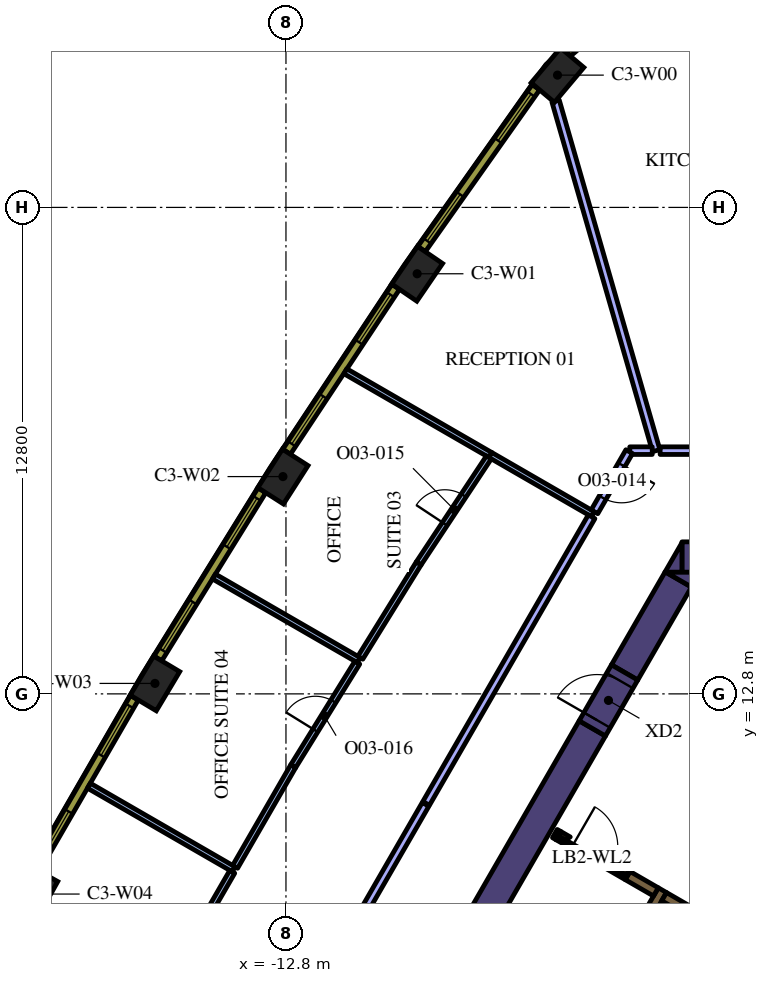
"""IFC4 building model, lengths in metres.
Left out: names, types, materials, properties, quantities, classifications, styles, units other than length and angle.
Written with IfcOpenShell. Run it as: python <this file> out.ifc"""

import sys

from ifc_helpers import new_model, si_unit, direction, frame, frame_2d, origin, origin_2d, place, context, subcontext, project, spatial, polyline, rectangle, outline, extrude, element, fill, save


model = new_model("IFC4")
c1 = context("Model", 3, precision=1e-05, world=origin(), true_north=direction((0.0, 1.0)))
c2 = subcontext(c1, "Body", "Model", "MODEL_VIEW")
j1 = project(units=[si_unit("LENGTHUNIT", "METRE"), si_unit("PLANEANGLEUNIT", "RADIAN")], contexts=[c1])
p1 = place(None, origin())
s1 = spatial("IfcSite", under=j1, at=p1, CompositionType="ELEMENT")
p2 = place(p1, origin())
s2 = spatial("IfcBuilding", under=s1, at=p2, CompositionType="ELEMENT")
p3 = place(p2, frame((0.0, 0.0, 171.0)))
s3 = spatial("IfcBuildingStorey", under=s2, at=p3, CompositionType="ELEMENT", Elevation=171.0)
for number, where, z_axis, x_axis in (
    (1, (-5.654, 29.081, 0.0), (0.0, 0.0, 1.0), (-0.644, -0.765, 0.0)),
    (2, (-9.348, 23.854, 0.0), (0.0, 0.0, 1.0), (-0.565, -0.825, 0.0)),
    (3, (-12.88, 18.517, 0.0), (0.0, 0.0, 1.0), (-0.539, -0.842, 0.0)),
    (4, (-16.247, 13.075, 0.0), (0.0, 0.0, 1.0), (-0.513, -0.858, 0.0)),
    (5, (-19.447, 7.533, 0.0), (0.0, 0.0, 1.0), (-0.487, -0.874, 0.0)),
):
    element("IfcColumn", number, at=place(p3, frame(where, z_axis=z_axis, x_axis=x_axis)), inside=s3, PredefinedType="COLUMN", context=c2, shape_type="SweptSolid", body=[
        extrude(rectangle(XDim=1.2, YDim=0.8, at=origin_2d()), origin(), (0.0, 0.0, 1.0), 4.2),
    ])
p4 = place(p3, frame((-2.379, 16.4, 0.0), z_axis=(0.0, 0.0, 1.0), x_axis=(1.0, 0.0, 0.0)))
e6 = element("IfcWall", 6, at=p4, inside=s3, PredefinedType="SOLIDWALL", context=c2, shape_type="SweptSolid", body=[
    extrude(rectangle(XDim=3.824, YDim=0.8, at=frame_2d((1.912, 0.0))), origin(), (0.0, 0.0, 1.0), 4.2),
])
p5 = place(p3, origin())
e7 = element("IfcWall", 7, at=p5, inside=s3, PredefinedType="SOLIDWALL", context=c2, shape_type="SweptSolid", body=[
    extrude(outline(polyline([(-2.829, 16.0), (-2.381, 16.776), (-2.381, 16.0), (-2.829, 16.0)])), origin(), (0.0, 0.0, 1.0), 4.2),
])
p6 = place(p3, frame((-2.477, 15.81, 0.0), z_axis=(0.0, 0.0, 1.0), x_axis=(-0.499969377405, -0.866043083026, 0.0)))
e8 = element("IfcWall", 8, at=p6, inside=s3, PredefinedType="SOLIDWALL", context=c2, shape_type="SweptSolid", body=[
    extrude(rectangle(XDim=2.824, YDim=0.8, at=frame_2d((1.412, 0.0))), origin(), (0.0, 0.0, 1.0), 4.2),
])
e9 = element("IfcWall", 9, at=p5, inside=s3, PredefinedType="SOLIDWALL", context=c2, shape_type="SweptSolid", body=[
    extrude(outline(polyline([(-1.905, 16.0), (-2.129, 15.612), (-2.801, 16.0), (-1.905, 16.0)])), origin(), (0.0, 0.0, 1.0), 4.2),
])
p7 = place(p3, frame((-12.668, -1.842, 0.0), z_axis=(0.0, 0.0, 1.0), x_axis=(0.500003640647, 0.866023301845, 0.0)))
e10 = element("IfcWall", 10, at=p7, inside=s3, PredefinedType="SOLIDWALL", context=c2, shape_type="SweptSolid", body=[
    extrude(rectangle(XDim=15.858, YDim=0.8, at=frame_2d((7.929, 0.0))), origin(), (0.0, 0.0, 1.0), 4.2),
])
p8 = place(p3, frame((-8.06, -1.311, 0.0), z_axis=(0.0, 0.0, 1.0), x_axis=(0.50000273126, 0.866023826885, 0.0)))
e11 = element("IfcWall", 11, at=p8, inside=s3, PredefinedType="SOLIDWALL", context=c2, shape_type="SweptSolid", body=[
    extrude(rectangle(XDim=10.33, YDim=0.25, at=frame_2d((5.165, 0.0))), origin(), (0.0, 0.0, 1.0), 4.2),
])
p9 = place(p3, frame((-1.76, 6.836, 0.0), z_axis=(0.0, 0.0, 1.0), x_axis=(-0.865952863304, 0.500125622755, 0.0)))
e12 = element("IfcWall", 12, at=p9, inside=s3, PredefinedType="SOLIDWALL", context=c2, shape_type="SweptSolid", body=[
    extrude(rectangle(XDim=1.258, YDim=0.25, at=frame_2d((0.629, 0.0))), origin(), (0.0, 0.0, 1.0), 4.2),
])
p10 = place(p3, frame((-5.725, 9.125, 0.0), z_axis=(0.0, 0.0, 1.0), x_axis=(0.866185586049, -0.49972245349, 0.0)))
e13 = element("IfcWall", 13, at=p10, inside=s3, PredefinedType="SOLIDWALL", context=c2, shape_type="SweptSolid", body=[
    extrude(rectangle(XDim=0.11, YDim=0.25, at=frame_2d((0.055, 0.0))), origin(), (0.0, 0.0, 1.0), 4.2),
])
p11 = place(p3, frame((-3.066, 7.59, 0.0), z_axis=(0.0, 0.0, 1.0), x_axis=(-0.866081358704, 0.49990307071, 0.0)))
e14 = element("IfcWall", 14, at=p11, inside=s3, PredefinedType="SOLIDWALL", context=c2, shape_type="SweptSolid", body=[
    extrude(rectangle(XDim=0.858, YDim=0.25, at=frame_2d((0.429, 0.0))), origin(), (0.0, 0.0, 1.0), 4.2),
])
e15 = element("IfcWall", 15, at=p5, inside=s3, PredefinedType="SOLIDWALL", context=c2, shape_type="SweptSolid", body=[
    extrude(outline(polyline([(-3.748, 8.128), (-3.813, 8.015), (-4.027, 8.139), (-4.017, 8.156), (-4.008, 8.173), (-4.0, 8.192), (-3.995, 8.21), (-3.991, 8.23), (-3.99, 8.25), (-3.99, 8.268), (-3.748, 8.128)])), origin(), (0.0, 0.0, 1.0), 4.2),
])
e16 = element("IfcWall", 16, at=p5, inside=s3, PredefinedType="SOLIDWALL", context=c2, shape_type="SweptSolid", body=[
    extrude(outline(polyline([(-5.689, 8.96), (-5.69, 8.961), (-5.565, 9.177), (-5.319, 9.035), (-5.335, 9.026), (-5.351, 9.015), (-5.366, 9.002), (-5.379, 8.988), (-5.392, 8.972), (-5.402, 8.956), (-5.412, 8.939), (-5.629, 9.064), (-5.629, 9.064), (-5.689, 8.96)])), origin(), (0.0, 0.0, 1.0), 4.2),
])
p12 = place(p3, frame((-5.659, 9.012, 0.0), z_axis=(0.0, 0.0, 1.0), x_axis=(0.866009402589, -0.500027713859, 0.0)))
e17 = element("IfcWall", 17, at=p12, inside=s3, PredefinedType="PARTITIONING", context=c2, shape_type="SweptSolid", body=[
    extrude(rectangle(XDim=2.1, YDim=0.12, at=frame_2d((1.05, 0.0))), origin(), (0.0, 0.0, 1.0), 3.15),
])
p13 = place(p12, frame((0.45, 0.0, 0.0)))
e18 = element("IfcOpeningElement", 18, at=p13, cuts=e17, PredefinedType="OPENING", context=c2, shape_type="SweptSolid", body=[
    extrude(rectangle(XDim=1.2, YDim=2.1, at=frame_2d((0.6, 1.05))), frame((0.0, 0.07, 0.0), z_axis=(0.0, -1.0, 0.0), x_axis=(1.0, 0.0, 0.0)), (0.0, 0.0, 1.0), 0.14),
])
p14 = place(p3, frame((-4.739, 11.892, 0.0), z_axis=(0.0, 0.0, 1.0), x_axis=(0.500062241894, 0.865989465428, 0.0)))
e19 = element("IfcWall", 19, at=p14, inside=s3, PredefinedType="SOLIDWALL", context=c2, shape_type="SweptSolid", body=[
    extrude(rectangle(XDim=1.7, YDim=0.8, at=frame_2d((0.85, 0.0))), origin(), (0.0, 0.0, 1.0), 4.2),
])
p15 = place(p14, frame((0.25, 0.0, 0.0)))
e20 = element("IfcOpeningElement", 20, at=p15, cuts=e19, PredefinedType="OPENING", context=c2, shape_type="SweptSolid", body=[
    extrude(rectangle(XDim=1.2, YDim=2.1, at=frame_2d((0.6, 1.05))), frame((0.0, 0.41, 0.0), z_axis=(0.0, -1.0, 0.0), x_axis=(1.0, 0.0, 0.0)), (0.0, 0.0, 1.0), 0.82),
])
p16 = place(p3, frame((-3.058, 19.2, 0.0), z_axis=(0.0, 0.0, 1.0), x_axis=(-0.276542988003, 0.961001548275, 0.0)))
e21 = element("IfcWall", 21, at=p16, inside=s3, PredefinedType="PARTITIONING", context=c2, shape_type="SweptSolid", body=[
    extrude(rectangle(XDim=9.573, YDim=0.2, at=frame_2d((4.786, 0.0))), origin(), (0.0, 0.0, 1.0), 3.15),
])
p17 = place(p3, frame((2.456, 19.2, 0.0), z_axis=(0.0, 0.0, 1.0), x_axis=(-1.0, 0.0, 0.0)))
e22 = element("IfcWall", 22, at=p17, inside=s3, PredefinedType="PARTITIONING", context=c2, shape_type="SweptSolid", body=[
    extrude(rectangle(XDim=5.41, YDim=0.2, at=frame_2d((2.705, 0.0))), origin(), (0.0, 0.0, 1.0), 3.15),
])
p18 = place(p3, frame((-7.416, 19.083, 0.0), z_axis=(0.0, 0.0, 1.0), x_axis=(-0.866028016946, 0.499995473844, 0.0)))
e23 = element("IfcWall", 23, at=p18, inside=s3, PredefinedType="PARTITIONING", context=c2, shape_type="SweptSolid", body=[
    extrude(rectangle(XDim=4.412, YDim=0.15, at=frame_2d((2.206, 0.0))), origin(), (0.0, 0.0, 1.0), 3.15),
])
p19 = place(p3, frame((-4.719, 17.526, 0.0), z_axis=(0.0, 0.0, 1.0), x_axis=(-0.866011075544, 0.500024816419, 0.0)))
e24 = element("IfcWall", 24, at=p19, inside=s3, PredefinedType="PARTITIONING", context=c2, shape_type="SweptSolid", body=[
    extrude(rectangle(XDim=3.122, YDim=0.15, at=frame_2d((1.561, 0.0))), origin(), (0.0, 0.0, 1.0), 3.15),
])
p20 = place(p3, frame((-3.162, 19.2, 0.0), z_axis=(0.0, 0.0, 1.0), x_axis=(-1.0, 0.0, 0.0)))
e25 = element("IfcWall", 25, at=p20, inside=s3, PredefinedType="PARTITIONING", context=c2, shape_type="SweptSolid", body=[
    extrude(rectangle(XDim=0.591, YDim=0.2, at=frame_2d((0.295, 0.0))), origin(), (0.0, 0.0, 1.0), 3.15),
])
p21 = place(p3, frame((-3.768, 19.174, 0.0), z_axis=(0.0, 0.0, 1.0), x_axis=(-0.499930512259, -0.866065518833, 0.0)))
e26 = element("IfcWall", 26, at=p21, inside=s3, PredefinedType="PARTITIONING", context=c2, shape_type="SweptSolid", body=[
    extrude(rectangle(XDim=1.828, YDim=0.2, at=frame_2d((0.914, 0.0))), origin(), (0.0, 0.0, 1.0), 3.15),
])
p22 = place(p21, frame((0.4, 0.0, 0.0)))
e27 = element("IfcOpeningElement", 27, at=p22, cuts=e26, PredefinedType="OPENING", context=c2, shape_type="SweptSolid", body=[
    extrude(rectangle(XDim=1.0, YDim=2.1, at=frame_2d((0.5, 1.05))), frame((0.0, 0.11, 0.0), z_axis=(0.0, -1.0, 0.0), x_axis=(1.0, 0.0, 0.0)), (0.0, 0.0, 1.0), 0.22),
])
p23 = place(p3, frame((-10.883, 13.687, 0.0), z_axis=(0.0, 0.0, 1.0), x_axis=(-0.866033195618, 0.499986503906, 0.0)))
e28 = element("IfcWall", 28, at=p23, inside=s3, PredefinedType="PARTITIONING", context=c2, shape_type="SweptSolid", body=[
    extrude(rectangle(XDim=4.402, YDim=0.15, at=frame_2d((2.201, 0.0))), origin(), (0.0, 0.0, 1.0), 3.15),
])
p24 = place(p3, frame((-9.308, 16.231, 0.0), z_axis=(0.0, 0.0, 1.0), x_axis=(0.551902709159, 0.833908507945, 0.0)))
e29 = element("IfcWall", 29, at=p24, inside=s3, PredefinedType="PARTITIONING", context=c2, shape_type="SweptSolid", body=[
    extrude(rectangle(XDim=3.347, YDim=0.15, at=frame_2d((1.673, 0.0))), origin(), (0.0, 0.0, 1.0), 3.15),
])
p25 = place(p24, frame((1.247, 0.0, 0.0)))
e30 = element("IfcOpeningElement", 30, at=p25, cuts=e29, PredefinedType="OPENING", context=c2, shape_type="SweptSolid", body=[
    extrude(rectangle(XDim=0.9, YDim=2.1, at=frame_2d((0.45, 1.05))), frame((0.0, 0.085, 0.0), z_axis=(0.0, -1.0, 0.0), x_axis=(1.0, 0.0, 0.0)), (0.0, 0.0, 1.0), 0.17),
])
p26 = place(p3, frame((-9.308, 16.231, 0.0), z_axis=(0.0, 0.0, 1.0), x_axis=(-0.526201893736, -0.850359669216, 0.0)))
e31 = element("IfcWall", 31, at=p26, inside=s3, PredefinedType="PARTITIONING", context=c2, shape_type="SweptSolid", body=[
    extrude(rectangle(XDim=2.917, YDim=0.15, at=frame_2d((1.458, 0.0))), origin(), (0.0, 0.0, 1.0), 3.15),
])
p27 = place(p3, frame((-14.175, 8.184, 0.0), z_axis=(0.0, 0.0, 1.0), x_axis=(-0.866032203192, 0.499988222896, 0.0)))
e32 = element("IfcWall", 32, at=p27, inside=s3, PredefinedType="PARTITIONING", context=c2, shape_type="SweptSolid", body=[
    extrude(rectangle(XDim=4.4, YDim=0.15, at=frame_2d((2.2, 0.0))), origin(), (0.0, 0.0, 1.0), 3.15),
])
p28 = place(p3, frame((-12.608, 10.899, 0.0), z_axis=(0.0, 0.0, 1.0), x_axis=(0.526170942761, 0.850378820876, 0.0)))
e33 = element("IfcWall", 33, at=p28, inside=s3, PredefinedType="PARTITIONING", context=c2, shape_type="SweptSolid", body=[
    extrude(rectangle(XDim=3.203, YDim=0.15, at=frame_2d((1.602, 0.0))), origin(), (0.0, 0.0, 1.0), 3.15),
])
p29 = place(p28, frame((1.103, 0.0, 0.0)))
e34 = element("IfcOpeningElement", 34, at=p29, cuts=e33, PredefinedType="OPENING", context=c2, shape_type="SweptSolid", body=[
    extrude(rectangle(XDim=0.9, YDim=2.1, at=frame_2d((0.45, 1.05))), frame((0.0, 0.085, 0.0), z_axis=(0.0, -1.0, 0.0), x_axis=(1.0, 0.0, 0.0)), (0.0, 0.0, 1.0), 0.17),
])
for number, where, z_axis, x_axis in (
    (35, (-12.608, 10.899, 0.0), (0.0, 0.0, 1.0), (-0.5, -0.866, 0.0)),
    (36, (-14.213, 8.119, 0.0), (0.0, 0.0, 1.0), (-0.5, -0.866, 0.0)),
):
    element("IfcWall", number, at=place(p3, frame(where, z_axis=z_axis, x_axis=x_axis)), inside=s3, PredefinedType="PARTITIONING", context=c2, shape_type="SweptSolid", body=[
        extrude(rectangle(XDim=3.06, YDim=0.15, at=frame_2d((1.53, 0.0))), origin(), (0.0, 0.0, 1.0), 3.15),
    ])
p30 = place(p3, frame((-9.126, 9.893, 0.0), z_axis=(0.0, 0.0, 1.0), x_axis=(-0.499995158272, -0.866028199139, 0.0)))
e37 = element("IfcWall", 37, at=p30, inside=s3, PredefinedType="PARTITIONING", context=c2, shape_type="SweptSolid", body=[
    extrude(rectangle(XDim=8.008, YDim=0.2, at=frame_2d((4.004, 0.0))), origin(), (0.0, 0.0, 1.0), 3.15),
])
p31 = place(p3, frame((-4.757, 17.461, 0.0), z_axis=(0.0, 0.0, 1.0), x_axis=(-0.499998278779, -0.866026397529, 0.0)))
e38 = element("IfcWall", 38, at=p31, inside=s3, PredefinedType="PARTITIONING", context=c2, shape_type="SweptSolid", body=[
    extrude(rectangle(XDim=8.709, YDim=0.2, at=frame_2d((4.354, 0.0))), origin(), (0.0, 0.0, 1.0), 3.15),
])
p32 = place(p3, frame((-3.678, 31.131, 0.0), z_axis=(0.0, 0.0, 1.0), x_axis=(-0.761419744247, -0.648259186645, 0.0)))
e39 = element("IfcWall", 39, at=p32, inside=s3, PredefinedType="SOLIDWALL", context=c2, shape_type="SweptSolid", body=[
    extrude(rectangle(XDim=2.25, YDim=0.24, at=frame_2d((1.125, 0.0))), origin(), (0.0, 0.0, 1.0), 3.95),
])
p33 = place(p32, frame((0.625, 0.0, 0.9)))
e40 = element("IfcOpeningElement", 40, at=p33, cuts=e39, PredefinedType="OPENING", context=c2, shape_type="SweptSolid", body=[
    extrude(rectangle(XDim=1.0, YDim=2.55, at=frame_2d((0.5, 1.275))), frame((0.0, 0.13, 0.0), z_axis=(0.0, -1.0, 0.0), x_axis=(1.0, 0.0, 0.0)), (0.0, 0.0, 1.0), 0.26),
])
p34 = place(p3, frame((-6.223, 28.762, 0.0), z_axis=(0.0, 0.0, 1.0), x_axis=(-0.577115207679, -0.816662743772, 0.0)))
e41 = element("IfcWall", 41, at=p34, inside=s3, PredefinedType="SOLIDWALL", context=c2, shape_type="SweptSolid", body=[
    extrude(rectangle(XDim=5.213, YDim=0.24, at=frame_2d((2.606, 0.0))), origin(), (0.0, 0.0, 1.0), 3.95),
])
p35 = place(p34, frame((0.221, 0.0, 0.9)))
e42 = element("IfcOpeningElement", 42, at=p35, cuts=e41, PredefinedType="OPENING", context=c2, shape_type="SweptSolid", body=[
    extrude(rectangle(XDim=1.5, YDim=2.55, at=frame_2d((0.75, 1.275))), frame((0.0, 0.13, 0.0), z_axis=(0.0, -1.0, 0.0), x_axis=(1.0, 0.0, 0.0)), (0.0, 0.0, 1.0), 0.26),
])
p36 = place(p34, frame((3.452, 0.0, 0.9)))
e43 = element("IfcOpeningElement", 43, at=p36, cuts=e41, PredefinedType="OPENING", context=c2, shape_type="SweptSolid", body=[
    extrude(rectangle(XDim=1.5, YDim=2.55, at=frame_2d((0.75, 1.275))), frame((0.0, 0.13, 0.0), z_axis=(0.0, -1.0, 0.0), x_axis=(1.0, 0.0, 0.0)), (0.0, 0.0, 1.0), 0.26),
])
p37 = place(p3, frame((-9.911, 23.51, 0.0), z_axis=(0.0, 0.0, 1.0), x_axis=(-0.551892811511, -0.833915058386, 0.0)))
e44 = element("IfcWall", 44, at=p37, inside=s3, PredefinedType="SOLIDWALL", context=c2, shape_type="SweptSolid", body=[
    extrude(rectangle(XDim=5.204, YDim=0.24, at=frame_2d((2.602, 0.0))), origin(), (0.0, 0.0, 1.0), 3.95),
])
p38 = place(p37, frame((0.248, 0.0, 0.9)))
e45 = element("IfcOpeningElement", 45, at=p38, cuts=e44, PredefinedType="OPENING", context=c2, shape_type="SweptSolid", body=[
    extrude(rectangle(XDim=1.5, YDim=2.55, at=frame_2d((0.75, 1.275))), frame((0.0, 0.13, 0.0), z_axis=(0.0, -1.0, 0.0), x_axis=(1.0, 0.0, 0.0)), (0.0, 0.0, 1.0), 0.26),
])
p39 = place(p37, frame((3.455, 0.0, 0.9)))
e46 = element("IfcOpeningElement", 46, at=p39, cuts=e44, PredefinedType="OPENING", context=c2, shape_type="SweptSolid", body=[
    extrude(rectangle(XDim=1.5, YDim=2.55, at=frame_2d((0.75, 1.275))), frame((0.0, 0.13, 0.0), z_axis=(0.0, -1.0, 0.0), x_axis=(1.0, 0.0, 0.0)), (0.0, 0.0, 1.0), 0.26),
])
p40 = place(p3, frame((-13.433, 18.156, 0.0), z_axis=(0.0, 0.0, 1.0), x_axis=(-0.526197926587, -0.850362124072, 0.0)))
e47 = element("IfcWall", 47, at=p40, inside=s3, PredefinedType="SOLIDWALL", context=c2, shape_type="SweptSolid", body=[
    extrude(rectangle(XDim=5.203, YDim=0.24, at=frame_2d((2.602, 0.0))), origin(), (0.0, 0.0, 1.0), 3.95),
])
p41 = place(p40, frame((0.248, 0.0, 0.9)))
e48 = element("IfcOpeningElement", 48, at=p41, cuts=e47, PredefinedType="OPENING", context=c2, shape_type="SweptSolid", body=[
    extrude(rectangle(XDim=1.5, YDim=2.55, at=frame_2d((0.75, 1.275))), frame((0.0, 0.13, 0.0), z_axis=(0.0, -1.0, 0.0), x_axis=(1.0, 0.0, 0.0)), (0.0, 0.0, 1.0), 0.26),
])
p42 = place(p40, frame((3.455, 0.0, 0.9)))
e49 = element("IfcOpeningElement", 49, at=p42, cuts=e47, PredefinedType="OPENING", context=c2, shape_type="SweptSolid", body=[
    extrude(rectangle(XDim=1.5, YDim=2.55, at=frame_2d((0.75, 1.275))), frame((0.0, 0.13, 0.0), z_axis=(0.0, -1.0, 0.0), x_axis=(1.0, 0.0, 0.0)), (0.0, 0.0, 1.0), 0.26),
])
p43 = place(p3, frame((-16.789, 12.697, 0.0), z_axis=(0.0, 0.0, 1.0), x_axis=(-0.500009456303, -0.866019944116, 0.0)))
e50 = element("IfcWall", 50, at=p43, inside=s3, PredefinedType="SOLIDWALL", context=c2, shape_type="SweptSolid", body=[
    extrude(rectangle(XDim=5.204, YDim=0.24, at=frame_2d((2.602, 0.0))), origin(), (0.0, 0.0, 1.0), 3.95),
])
p44 = place(p43, frame((0.248, 0.0, 0.9)))
e51 = element("IfcOpeningElement", 51, at=p44, cuts=e50, PredefinedType="OPENING", context=c2, shape_type="SweptSolid", body=[
    extrude(rectangle(XDim=1.5, YDim=2.55, at=frame_2d((0.75, 1.275))), frame((0.0, 0.13, 0.0), z_axis=(0.0, -1.0, 0.0), x_axis=(1.0, 0.0, 0.0)), (0.0, 0.0, 1.0), 0.26),
])
p45 = place(p43, frame((3.455, 0.0, 0.9)))
e52 = element("IfcOpeningElement", 52, at=p45, cuts=e50, PredefinedType="OPENING", context=c2, shape_type="SweptSolid", body=[
    extrude(rectangle(XDim=1.5, YDim=2.55, at=frame_2d((0.75, 1.275))), frame((0.0, 0.13, 0.0), z_axis=(0.0, -1.0, 0.0), x_axis=(1.0, 0.0, 0.0)), (0.0, 0.0, 1.0), 0.26),
])
p46 = place(p13, origin())
e53 = element("IfcDoor", 53, at=p46, inside=s3, OperationType="SINGLE_SWING_LEFT", PredefinedType="DOOR", context=c2, shape_type="SweptSolid", body=[
    extrude(rectangle(XDim=1.2, YDim=2.1, at=frame_2d((0.6, 1.05))), frame((0.0, 0.025, 0.0), z_axis=(0.0, -1.0, 0.0), x_axis=(1.0, 0.0, 0.0)), (0.0, 0.0, 1.0), 0.05),
])
fill(e18, e53)
p47 = place(p15, origin())
e54 = element("IfcDoor", 54, at=p47, inside=s3, OperationType="SINGLE_SWING_LEFT", PredefinedType="DOOR", context=c2, shape_type="SweptSolid", body=[
    extrude(rectangle(XDim=1.2, YDim=2.1, at=frame_2d((0.6, 1.05))), frame((0.0, 0.025, 0.0), z_axis=(0.0, -1.0, 0.0), x_axis=(1.0, 0.0, 0.0)), (0.0, 0.0, 1.0), 0.05),
])
fill(e20, e54)
p48 = place(p22, origin())
e55 = element("IfcDoor", 55, at=p48, inside=s3, OperationType="SINGLE_SWING_LEFT", PredefinedType="DOOR", context=c2, shape_type="SweptSolid", body=[
    extrude(rectangle(XDim=1.0, YDim=2.1, at=frame_2d((0.5, 1.05))), frame((0.0, 0.025, 0.0), z_axis=(0.0, -1.0, 0.0), x_axis=(1.0, 0.0, 0.0)), (0.0, 0.0, 1.0), 0.05),
])
fill(e27, e55)
p49 = place(p25, origin())
e56 = element("IfcDoor", 56, at=p49, inside=s3, OperationType="SINGLE_SWING_RIGHT", PredefinedType="DOOR", context=c2, shape_type="SweptSolid", body=[
    extrude(rectangle(XDim=0.9, YDim=2.1, at=frame_2d((0.45, 1.05))), frame((0.0, 0.025, 0.0), z_axis=(0.0, -1.0, 0.0), x_axis=(1.0, 0.0, 0.0)), (0.0, 0.0, 1.0), 0.05),
])
fill(e30, e56)
p50 = place(p29, origin())
e57 = element("IfcDoor", 57, at=p50, inside=s3, OperationType="SINGLE_SWING_LEFT", PredefinedType="DOOR", context=c2, shape_type="SweptSolid", body=[
    extrude(rectangle(XDim=0.9, YDim=2.1, at=frame_2d((0.45, 1.05))), frame((0.0, 0.025, 0.0), z_axis=(0.0, -1.0, 0.0), x_axis=(1.0, 0.0, 0.0)), (0.0, 0.0, 1.0), 0.05),
])
fill(e34, e57)
p51 = place(p35, origin())
e58 = element("IfcWindow", 58, at=p51, inside=s3, PartitioningType="SINGLE_PANEL", PredefinedType="WINDOW", context=c2, shape_type="SweptSolid", body=[
    extrude(rectangle(XDim=1.5, YDim=2.55, at=frame_2d((0.75, 1.275))), frame((0.0, 0.04, 0.0), z_axis=(0.0, -1.0, 0.0), x_axis=(1.0, 0.0, 0.0)), (0.0, 0.0, 1.0), 0.06),
])
fill(e42, e58)
p52 = place(p36, origin())
e59 = element("IfcWindow", 59, at=p52, inside=s3, PartitioningType="SINGLE_PANEL", PredefinedType="WINDOW", context=c2, shape_type="SweptSolid", body=[
    extrude(rectangle(XDim=1.5, YDim=2.55, at=frame_2d((0.75, 1.275))), frame((0.0, 0.04, 0.0), z_axis=(0.0, -1.0, 0.0), x_axis=(1.0, 0.0, 0.0)), (0.0, 0.0, 1.0), 0.06),
])
fill(e43, e59)
p53 = place(p38, origin())
e60 = element("IfcWindow", 60, at=p53, inside=s3, PartitioningType="SINGLE_PANEL", PredefinedType="WINDOW", context=c2, shape_type="SweptSolid", body=[
    extrude(rectangle(XDim=1.5, YDim=2.55, at=frame_2d((0.75, 1.275))), frame((0.0, 0.04, 0.0), z_axis=(0.0, -1.0, 0.0), x_axis=(1.0, 0.0, 0.0)), (0.0, 0.0, 1.0), 0.06),
])
fill(e45, e60)
p54 = place(p39, origin())
e61 = element("IfcWindow", 61, at=p54, inside=s3, PartitioningType="SINGLE_PANEL", PredefinedType="WINDOW", context=c2, shape_type="SweptSolid", body=[
    extrude(rectangle(XDim=1.5, YDim=2.55, at=frame_2d((0.75, 1.275))), frame((0.0, 0.04, 0.0), z_axis=(0.0, -1.0, 0.0), x_axis=(1.0, 0.0, 0.0)), (0.0, 0.0, 1.0), 0.06),
])
fill(e46, e61)
p55 = place(p41, origin())
e62 = element("IfcWindow", 62, at=p55, inside=s3, PartitioningType="SINGLE_PANEL", PredefinedType="WINDOW", context=c2, shape_type="SweptSolid", body=[
    extrude(rectangle(XDim=1.5, YDim=2.55, at=frame_2d((0.75, 1.275))), frame((0.0, 0.04, 0.0), z_axis=(0.0, -1.0, 0.0), x_axis=(1.0, 0.0, 0.0)), (0.0, 0.0, 1.0), 0.06),
])
fill(e48, e62)
p56 = place(p42, origin())
e63 = element("IfcWindow", 63, at=p56, inside=s3, PartitioningType="SINGLE_PANEL", PredefinedType="WINDOW", context=c2, shape_type="SweptSolid", body=[
    extrude(rectangle(XDim=1.5, YDim=2.55, at=frame_2d((0.75, 1.275))), frame((0.0, 0.04, 0.0), z_axis=(0.0, -1.0, 0.0), x_axis=(1.0, 0.0, 0.0)), (0.0, 0.0, 1.0), 0.06),
])
fill(e49, e63)
p57 = place(p44, origin())
e64 = element("IfcWindow", 64, at=p57, inside=s3, PartitioningType="SINGLE_PANEL", PredefinedType="WINDOW", context=c2, shape_type="SweptSolid", body=[
    extrude(rectangle(XDim=1.5, YDim=2.55, at=frame_2d((0.75, 1.275))), frame((0.0, 0.04, 0.0), z_axis=(0.0, -1.0, 0.0), x_axis=(1.0, 0.0, 0.0)), (0.0, 0.0, 1.0), 0.06),
])
fill(e51, e64)
p58 = place(p45, origin())
e65 = element("IfcWindow", 65, at=p58, inside=s3, PartitioningType="SINGLE_PANEL", PredefinedType="WINDOW", context=c2, shape_type="SweptSolid", body=[
    extrude(rectangle(XDim=1.5, YDim=2.55, at=frame_2d((0.75, 1.275))), frame((0.0, 0.04, 0.0), z_axis=(0.0, -1.0, 0.0), x_axis=(1.0, 0.0, 0.0)), (0.0, 0.0, 1.0), 0.06),
])
fill(e52, e65)
save(model, sys.argv[1])
